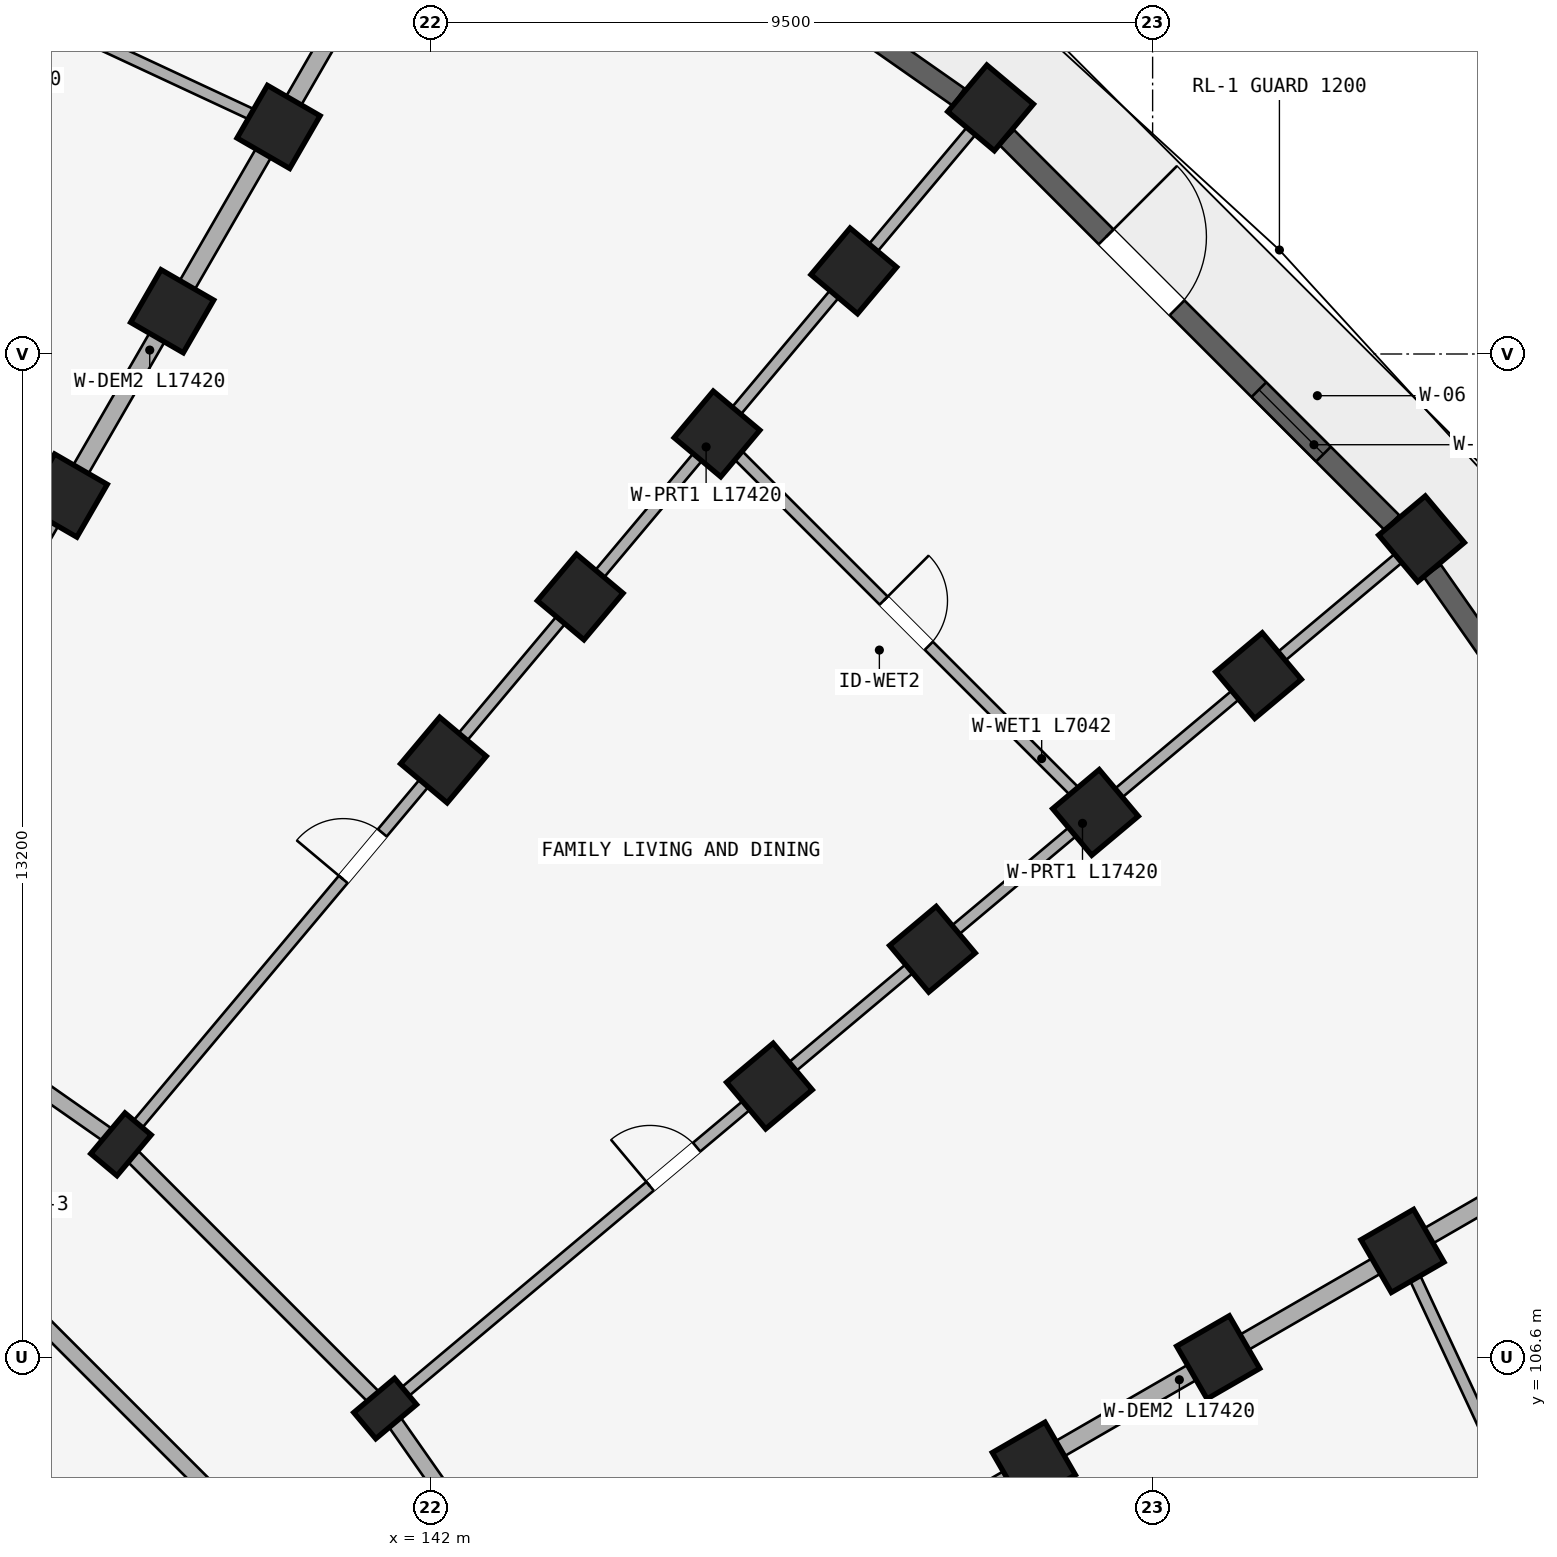
"""IFC4 building model, lengths in metres.
Left out: names, types, materials, properties, quantities, classifications, styles, units other than length and angle.
Written with IfcOpenShell. Run it as: python <this file> out.ifc"""

import sys

from ifc_helpers import new_model, si_unit, direction, frame, frame_2d, origin, origin_2d, place, context, subcontext, project, spatial, rectangle, extrude, element, fill, save


model = new_model("IFC4")
c1 = context("Model", 3, precision=1e-05, world=origin(), true_north=direction((0.0, 1.0)))
c2 = subcontext(c1, "Body", "Model", "MODEL_VIEW")
j1 = project(units=[si_unit("LENGTHUNIT", "METRE"), si_unit("PLANEANGLEUNIT", "RADIAN")], contexts=[c1])
p1 = place(None, origin())
s1 = spatial("IfcSite", under=j1, at=p1, CompositionType="ELEMENT")
p2 = place(p1, origin())
s2 = spatial("IfcBuilding", under=s1, at=p2, CompositionType="ELEMENT")
p3 = place(p2, frame((0.0, 0.0, 11.85)))
s3 = spatial("IfcBuildingStorey", under=s2, at=p3, CompositionType="ELEMENT", Elevation=11.85)
for number, where, z_axis, x_axis in (
    (1, (137.2, 117.938, 0.0), (0.0, 0.0, 1.0), (-0.866, 0.5, 0.0)),
    (2, (138.6, 120.363, 0.0), (0.0, 0.0, 1.0), (-0.866, 0.5, 0.0)),
    (3, (140.0, 122.787, 0.0), (0.0, 0.0, 1.0), (-0.866, 0.5, 0.0)),
):
    element("IfcColumn", number, at=place(p3, frame(where, z_axis=z_axis, x_axis=x_axis)), inside=s3, PredefinedType="COLUMN", context=c2, shape_type="SweptSolid", body=[
        extrude(rectangle(XDim=0.8, YDim=0.8, at=origin_2d()), origin(), (0.0, 0.0, 1.0), 2.93),
    ])
p4 = place(p3, frame((137.927, 109.402, 0.0), z_axis=(0.0, 0.0, 1.0), x_axis=(-0.766044443119, 0.642787609687, 0.0)))
e4 = element("IfcColumn", 4, at=p4, inside=s3, PredefinedType="COLUMN", context=c2, shape_type="SweptSolid", body=[
    extrude(rectangle(XDim=0.45, YDim=0.7, at=origin_2d()), origin(), (0.0, 0.0, 1.0), 2.93),
])
for number, where, z_axis, x_axis in (
    (5, (142.169, 114.458, 0.0), (0.0, 0.0, 1.0), (-0.766, 0.643, 0.0)),
    (6, (143.969, 116.603, 0.0), (0.0, 0.0, 1.0), (-0.766, 0.643, 0.0)),
    (7, (145.769, 118.748, 0.0), (0.0, 0.0, 1.0), (-0.766, 0.643, 0.0)),
    (8, (147.568, 120.893, 0.0), (0.0, 0.0, 1.0), (-0.766, 0.643, 0.0)),
    (9, (149.368, 123.038, 0.0), (0.0, 0.0, 1.0), (-0.766, 0.643, 0.0)),
):
    element("IfcColumn", number, at=place(p3, frame(where, z_axis=z_axis, x_axis=x_axis)), inside=s3, PredefinedType="COLUMN", context=c2, shape_type="SweptSolid", body=[
        extrude(rectangle(XDim=0.8, YDim=0.8, at=origin_2d()), origin(), (0.0, 0.0, 1.0), 2.93),
    ])
p5 = place(p3, frame((141.402, 105.927, 0.0), z_axis=(0.0, 0.0, 1.0), x_axis=(-0.642787609687, 0.766044443119, 0.0)))
e10 = element("IfcColumn", 10, at=p5, inside=s3, PredefinedType="COLUMN", context=c2, shape_type="SweptSolid", body=[
    extrude(rectangle(XDim=0.45, YDim=0.7, at=origin_2d()), origin(), (0.0, 0.0, 1.0), 2.93),
])
for number, where, z_axis, x_axis in (
    (11, (146.458, 110.169, 0.0), (0.0, 0.0, 1.0), (-0.643, 0.766, 0.0)),
    (12, (148.603, 111.969, 0.0), (0.0, 0.0, 1.0), (-0.643, 0.766, 0.0)),
    (13, (150.748, 113.769, 0.0), (0.0, 0.0, 1.0), (-0.643, 0.766, 0.0)),
    (14, (152.893, 115.568, 0.0), (0.0, 0.0, 1.0), (-0.643, 0.766, 0.0)),
    (15, (155.038, 117.368, 0.0), (0.0, 0.0, 1.0), (-0.643, 0.766, 0.0)),
    (16, (149.938, 105.2, 0.0), (0.0, 0.0, 1.0), (-0.5, 0.866, 0.0)),
    (17, (152.363, 106.6, 0.0), (0.0, 0.0, 1.0), (-0.5, 0.866, 0.0)),
    (18, (154.787, 108.0, 0.0), (0.0, 0.0, 1.0), (-0.5, 0.866, 0.0)),
):
    element("IfcColumn", number, at=place(p3, frame(where, z_axis=z_axis, x_axis=x_axis)), inside=s3, PredefinedType="COLUMN", context=c2, shape_type="SweptSolid", body=[
        extrude(rectangle(XDim=0.8, YDim=0.8, at=origin_2d()), origin(), (0.0, 0.0, 1.0), 2.93),
    ])
p6 = place(p3, frame((133.9, 112.222, 0.0), z_axis=(0.0, 0.0, 1.0), x_axis=(0.819140911474, -0.573592335331, 0.0)))
e19 = element("IfcWall", 19, at=p6, inside=s3, PredefinedType="STANDARD", context=c2, shape_type="SweptSolid", body=[
    extrude(rectangle(XDim=4.916, YDim=0.2, at=frame_2d((2.458, 0.0))), origin(), (0.0, 0.0, 1.0), 2.372),
])
p7 = place(p6, frame((1.888, 0.0, 0.0)))
e20 = element("IfcOpeningElement", 20, at=p7, cuts=e19, PredefinedType="OPENING", context=c2, shape_type="SweptSolid", body=[
    extrude(rectangle(XDim=1.14, YDim=2.15, at=frame_2d((0.57, 1.075))), frame((0.0, 0.11, 0.0), z_axis=(0.0, -1.0, 0.0), x_axis=(1.0, 0.0, 0.0)), (0.0, 0.0, 1.0), 0.22),
])
p8 = place(p3, frame((136.384, 107.564, 0.0), z_axis=(0.0, 0.0, 1.0), x_axis=(0.707106781187, -0.707106781187, 0.0)))
e21 = element("IfcWall", 21, at=p8, inside=s3, PredefinedType="STANDARD", context=c2, shape_type="SweptSolid", body=[
    extrude(rectangle(XDim=4.497, YDim=0.2, at=frame_2d((2.249, 0.0))), origin(), (0.0, 0.0, 1.0), 2.372),
])
p9 = place(p3, frame((137.927, 109.402, 0.0), z_axis=(0.0, 0.0, 1.0), x_axis=(0.707106781187, -0.707106781187, 0.0)))
e22 = element("IfcWall", 22, at=p9, inside=s3, PredefinedType="STANDARD", context=c2, shape_type="SweptSolid", body=[
    extrude(rectangle(XDim=4.916, YDim=0.2, at=frame_2d((2.458, 0.0))), origin(), (0.0, 0.0, 1.0), 2.372),
])
p10 = place(p3, frame((141.402, 105.927, 0.0), z_axis=(0.0, 0.0, 1.0), x_axis=(0.573592335331, -0.819140911474, 0.0)))
e23 = element("IfcWall", 23, at=p10, inside=s3, PredefinedType="STANDARD", context=c2, shape_type="SweptSolid", body=[
    extrude(rectangle(XDim=4.916, YDim=0.2, at=frame_2d((2.458, 0.0))), origin(), (0.0, 0.0, 1.0), 2.372),
])
p11 = place(p3, frame((133.95, 112.309, 0.0), z_axis=(0.0, 0.0, 1.0), x_axis=(0.499997843263, 0.866026648973, 0.0)))
e24 = element("IfcWall", 24, at=p11, inside=s3, PredefinedType="STANDARD", context=c2, shape_type="SweptSolid", body=[
    extrude(rectangle(XDim=17.42, YDim=0.23, at=frame_2d((8.71, 0.0))), origin(), (0.0, 0.0, 1.0), 2.372),
])
p12 = place(p3, frame((137.991, 109.479, 0.0), z_axis=(0.0, 0.0, 1.0), x_axis=(0.642784757967, 0.766046835987, 0.0)))
e25 = element("IfcWall", 25, at=p12, inside=s3, PredefinedType="PARTITIONING", context=c2, shape_type="SweptSolid", body=[
    extrude(rectangle(XDim=17.42, YDim=0.15, at=frame_2d((8.71, 0.0))), origin(), (0.0, 0.0, 1.0), 2.372),
])
p13 = place(p12, frame((4.45, 0.0, 0.0)))
e26 = element("IfcOpeningElement", 26, at=p13, cuts=e25, PredefinedType="OPENING", context=c2, shape_type="SweptSolid", body=[
    extrude(rectangle(XDim=0.8, YDim=2.1, at=frame_2d((0.4, 1.05))), frame((0.0, 0.085, 0.0), z_axis=(0.0, -1.0, 0.0), x_axis=(1.0, 0.0, 0.0)), (0.0, 0.0, 1.0), 0.17),
])
p14 = place(p3, frame((141.479, 105.991, 0.0), z_axis=(0.0, 0.0, 1.0), x_axis=(0.766046835987, 0.642784757967, 0.0)))
e27 = element("IfcWall", 27, at=p14, inside=s3, PredefinedType="PARTITIONING", context=c2, shape_type="SweptSolid", body=[
    extrude(rectangle(XDim=17.42, YDim=0.15, at=frame_2d((8.71, 0.0))), origin(), (0.0, 0.0, 1.0), 2.372),
])
p15 = place(p14, frame((4.45, 0.0, 0.0)))
e28 = element("IfcOpeningElement", 28, at=p15, cuts=e27, PredefinedType="OPENING", context=c2, shape_type="SweptSolid", body=[
    extrude(rectangle(XDim=0.8, YDim=2.1, at=frame_2d((0.4, 1.05))), frame((0.0, 0.085, 0.0), z_axis=(0.0, -1.0, 0.0), x_axis=(1.0, 0.0, 0.0)), (0.0, 0.0, 1.0), 0.17),
])
p16 = place(p3, frame((144.309, 101.95, 0.0), z_axis=(0.0, 0.0, 1.0), x_axis=(0.866026648973, 0.499997843263, 0.0)))
e29 = element("IfcWall", 29, at=p16, inside=s3, PredefinedType="STANDARD", context=c2, shape_type="SweptSolid", body=[
    extrude(rectangle(XDim=17.42, YDim=0.23, at=frame_2d((8.71, 0.0))), origin(), (0.0, 0.0, 1.0), 2.372),
])
p17 = place(p3, frame((133.618, 125.764, 0.0), z_axis=(0.0, 0.0, 1.0), x_axis=(0.906297360311, -0.422640621205, 0.0)))
e30 = element("IfcWall", 30, at=p17, inside=s3, PredefinedType="PLUMBINGWALL", context=c2, shape_type="SweptSolid", body=[
    extrude(rectangle(XDim=7.042, YDim=0.15, at=frame_2d((3.521, 0.0))), origin(), (0.0, 0.0, 1.0), 2.372),
])
p18 = place(p17, frame((3.141, 0.0, 0.0)))
e31 = element("IfcOpeningElement", 31, at=p18, cuts=e30, PredefinedType="OPENING", context=c2, shape_type="SweptSolid", body=[
    extrude(rectangle(XDim=0.76, YDim=2.05, at=frame_2d((0.38, 1.025))), frame((0.0, 0.085, 0.0), z_axis=(0.0, -1.0, 0.0), x_axis=(1.0, 0.0, 0.0)), (0.0, 0.0, 1.0), 0.17),
])
p19 = place(p3, frame((145.769, 118.748, 0.0), z_axis=(0.0, 0.0, 1.0), x_axis=(0.707106781187, -0.707106781187, 0.0)))
e32 = element("IfcWall", 32, at=p19, inside=s3, PredefinedType="PLUMBINGWALL", context=c2, shape_type="SweptSolid", body=[
    extrude(rectangle(XDim=7.042, YDim=0.15, at=frame_2d((3.521, 0.0))), origin(), (0.0, 0.0, 1.0), 2.372),
])
p20 = place(p19, frame((3.101, 0.0, 0.0)))
e33 = element("IfcOpeningElement", 33, at=p20, cuts=e32, PredefinedType="OPENING", context=c2, shape_type="SweptSolid", body=[
    extrude(rectangle(XDim=0.84, YDim=2.1, at=frame_2d((0.42, 1.05))), frame((0.0, 0.085, 0.0), z_axis=(0.0, -1.0, 0.0), x_axis=(1.0, 0.0, 0.0)), (0.0, 0.0, 1.0), 0.17),
])
p21 = place(p3, frame((154.787, 108.0, 0.0), z_axis=(0.0, 0.0, 1.0), x_axis=(0.422640621205, -0.906297360311, 0.0)))
e34 = element("IfcWall", 34, at=p21, inside=s3, PredefinedType="PLUMBINGWALL", context=c2, shape_type="SweptSolid", body=[
    extrude(rectangle(XDim=7.042, YDim=0.15, at=frame_2d((3.521, 0.0))), origin(), (0.0, 0.0, 1.0), 2.372),
])
p22 = place(p21, frame((3.121, 0.0, 0.0)))
e35 = element("IfcOpeningElement", 35, at=p22, cuts=e34, PredefinedType="OPENING", context=c2, shape_type="SweptSolid", body=[
    extrude(rectangle(XDim=0.8, YDim=2.1, at=frame_2d((0.4, 1.05))), frame((0.0, 0.085, 0.0), z_axis=(0.0, -1.0, 0.0), x_axis=(1.0, 0.0, 0.0)), (0.0, 0.0, 1.0), 0.17),
])
p23 = place(p3, frame((143.078, 127.29, 0.0), z_axis=(0.0, 0.0, 1.0), x_axis=(0.819161471697, -0.573562972382, 0.0)))
e36 = element("IfcWall", 36, at=p23, inside=s3, PredefinedType="STANDARD", context=c2, shape_type="SweptSolid", body=[
    extrude(rectangle(XDim=7.164, YDim=0.275, at=frame_2d((3.582, 0.0))), origin(), (0.0, 0.0, 1.0), 2.372),
])
p24 = place(p23, frame((2.607, 0.0, 0.322)))
e37 = element("IfcOpeningElement", 37, at=p24, cuts=e36, PredefinedType="OPENING", context=c2, shape_type="SweptSolid", body=[
    extrude(rectangle(XDim=1.95, YDim=1.85, at=frame_2d((0.975, 0.925))), frame((0.0, 0.147, 0.0), z_axis=(0.0, -1.0, 0.0), x_axis=(1.0, 0.0, 0.0)), (0.0, 0.0, 1.0), 0.295),
])
p25 = place(p3, frame((149.582, 122.648, 0.0), z_axis=(0.0, 0.0, 1.0), x_axis=(0.707106781187, -0.707106781187, 0.0)))
e38 = element("IfcWall", 38, at=p25, inside=s3, PredefinedType="STANDARD", context=c2, shape_type="SweptSolid", body=[
    extrude(rectangle(XDim=7.164, YDim=0.275, at=frame_2d((3.582, 0.0))), origin(), (0.0, 0.0, 1.0), 2.372),
])
p26 = place(p25, frame((4.69, 0.0, 0.522)))
e39 = element("IfcOpeningElement", 39, at=p26, cuts=e38, PredefinedType="OPENING", context=c2, shape_type="SweptSolid", body=[
    extrude(rectangle(XDim=1.2, YDim=1.5, at=frame_2d((0.6, 0.75))), frame((0.0, 0.147, 0.0), z_axis=(0.0, -1.0, 0.0), x_axis=(1.0, 0.0, 0.0)), (0.0, 0.0, 1.0), 0.295),
])
p27 = place(p25, frame((1.847, 0.0, 0.0)))
e40 = element("IfcOpeningElement", 40, at=p27, cuts=e38, PredefinedType="OPENING", context=c2, shape_type="SweptSolid", body=[
    extrude(rectangle(XDim=1.32, YDim=2.15, at=frame_2d((0.66, 1.075))), frame((0.0, 0.147, 0.0), z_axis=(0.0, -1.0, 0.0), x_axis=(1.0, 0.0, 0.0)), (0.0, 0.0, 1.0), 0.295),
])
p28 = place(p3, frame((155.181, 116.947, 0.0), z_axis=(0.0, 0.0, 1.0), x_axis=(0.573562972382, -0.819161471697, 0.0)))
e41 = element("IfcWall", 41, at=p28, inside=s3, PredefinedType="STANDARD", context=c2, shape_type="SweptSolid", body=[
    extrude(rectangle(XDim=7.164, YDim=0.275, at=frame_2d((3.582, 0.0))), origin(), (0.0, 0.0, 1.0), 2.372),
])
p29 = place(p28, frame((2.757, 0.0, 0.422)))
e42 = element("IfcOpeningElement", 42, at=p29, cuts=e41, PredefinedType="OPENING", context=c2, shape_type="SweptSolid", body=[
    extrude(rectangle(XDim=1.65, YDim=1.75, at=frame_2d((0.825, 0.875))), frame((0.0, 0.147, 0.0), z_axis=(0.0, -1.0, 0.0), x_axis=(1.0, 0.0, 0.0)), (0.0, 0.0, 1.0), 0.295),
])
p30 = place(p26, origin())
e43 = element("IfcWindow", 43, at=p30, inside=s3, PartitioningType="SINGLE_PANEL", PredefinedType="WINDOW", context=c2, shape_type="SweptSolid", body=[
    extrude(rectangle(XDim=1.2, YDim=1.5, at=frame_2d((0.6, 0.75))), frame((0.0, 0.03, 0.0), z_axis=(0.0, -1.0, 0.0), x_axis=(1.0, 0.0, 0.0)), (0.0, 0.0, 1.0), 0.06),
])
fill(e39, e43)
p31 = place(p13, frame((0.8, 0.0, 0.0), z_axis=(0.0, 0.0, 1.0), x_axis=(-1.0, 0.0, 0.0)))
e44 = element("IfcDoor", 44, at=p31, inside=s3, OperationType="SINGLE_SWING_RIGHT", PredefinedType="DOOR", context=c2, shape_type="SweptSolid", body=[
    extrude(rectangle(XDim=0.8, YDim=2.1, at=frame_2d((0.4, 1.05))), frame((0.0, 0.025, 0.0), z_axis=(0.0, -1.0, 0.0), x_axis=(1.0, 0.0, 0.0)), (0.0, 0.0, 1.0), 0.05),
])
fill(e26, e44)
p32 = place(p15, origin())
e45 = element("IfcDoor", 45, at=p32, inside=s3, OperationType="SINGLE_SWING_LEFT", PredefinedType="DOOR", context=c2, shape_type="SweptSolid", body=[
    extrude(rectangle(XDim=0.8, YDim=2.1, at=frame_2d((0.4, 1.05))), frame((0.0, 0.025, 0.0), z_axis=(0.0, -1.0, 0.0), x_axis=(1.0, 0.0, 0.0)), (0.0, 0.0, 1.0), 0.05),
])
fill(e28, e45)
p33 = place(p20, origin())
e46 = element("IfcDoor", 46, at=p33, inside=s3, OperationType="SINGLE_SWING_LEFT", PredefinedType="DOOR", context=c2, shape_type="SweptSolid", body=[
    extrude(rectangle(XDim=0.84, YDim=2.1, at=frame_2d((0.42, 1.05))), frame((0.0, 0.025, 0.0), z_axis=(0.0, -1.0, 0.0), x_axis=(1.0, 0.0, 0.0)), (0.0, 0.0, 1.0), 0.05),
])
fill(e33, e46)
p34 = place(p27, origin())
e47 = element("IfcDoor", 47, at=p34, inside=s3, OperationType="SINGLE_SWING_LEFT", PredefinedType="DOOR", context=c2, shape_type="SweptSolid", body=[
    extrude(rectangle(XDim=1.32, YDim=2.15, at=frame_2d((0.66, 1.075))), frame((0.0, 0.025, 0.0), z_axis=(0.0, -1.0, 0.0), x_axis=(1.0, 0.0, 0.0)), (0.0, 0.0, 1.0), 0.05),
])
fill(e40, e47)
save(model, sys.argv[1])
